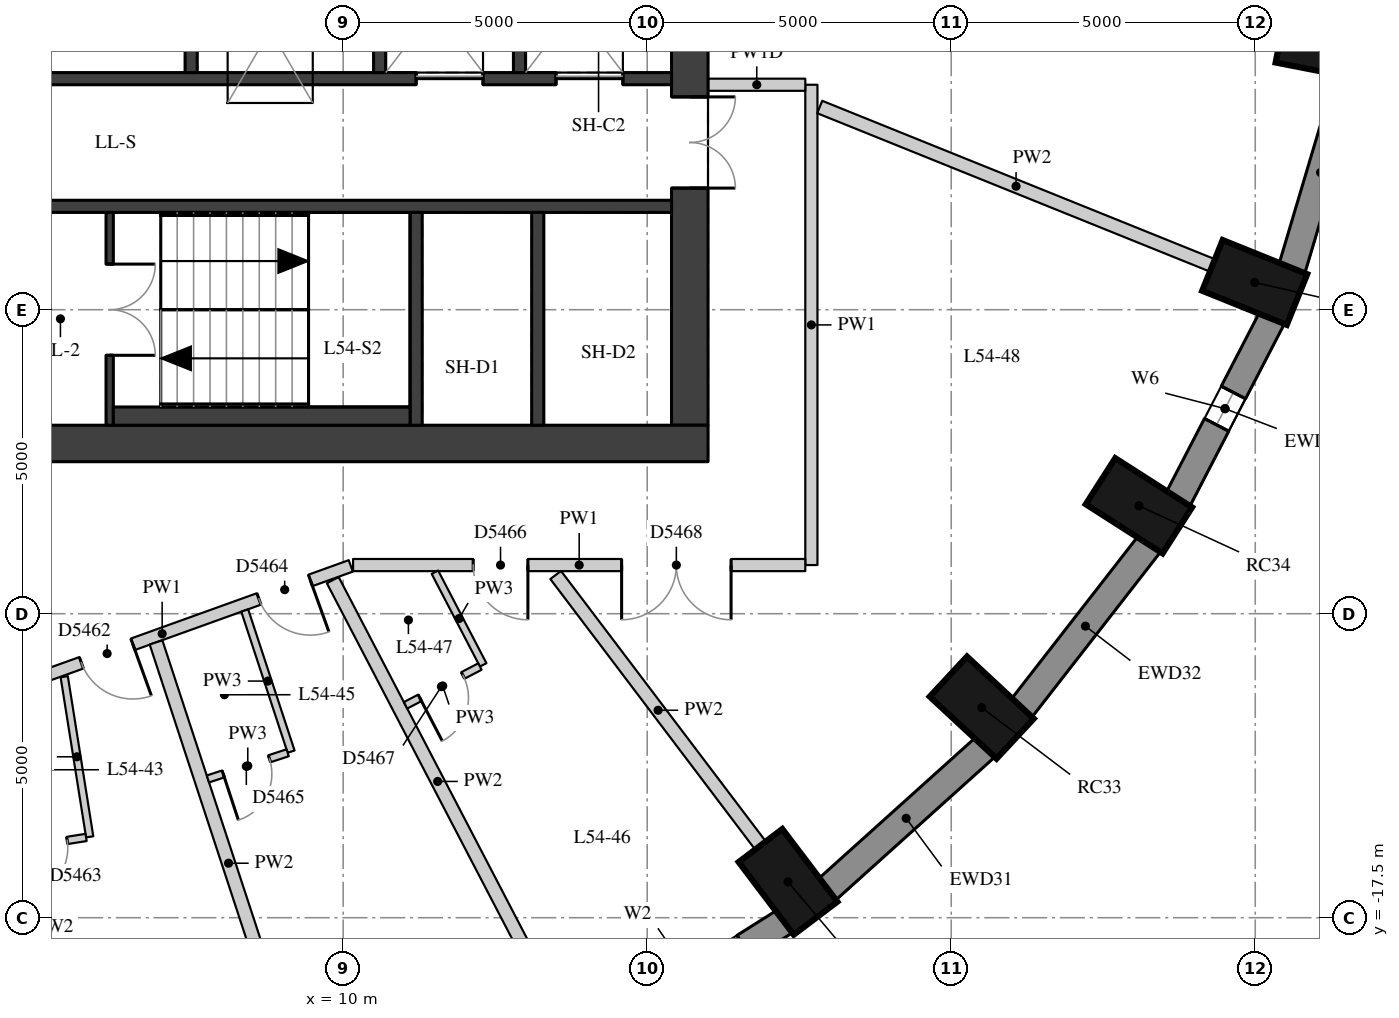
"""IFC4 building model, lengths in metres.
Left out: names, types, materials, properties, quantities, classifications, styles, units other than length and angle.
Written with IfcOpenShell. Run it as: python <this file> out.ifc"""

import sys

from ifc_helpers import new_model, si_unit, direction, frame, frame_2d, origin, origin_2d, place, context, subcontext, project, spatial, rectangle, extrude, element, fill, save


model = new_model("IFC4")
c1 = context("Model", 3, precision=1e-05, world=origin(), true_north=direction((0.0, 1.0)))
c2 = subcontext(c1, "Body", "Model", "MODEL_VIEW")
j1 = project(units=[si_unit("LENGTHUNIT", "METRE"), si_unit("PLANEANGLEUNIT", "RADIAN")], contexts=[c1])
p1 = place(None, origin())
s1 = spatial("IfcSite", under=j1, at=p1, CompositionType="ELEMENT")
p2 = place(p1, origin())
s2 = spatial("IfcBuilding", under=s1, at=p2, CompositionType="ELEMENT")
p3 = place(p2, frame((0.0, 0.0, 192.5)))
s3 = spatial("IfcBuildingStorey", under=s2, at=p3, CompositionType="ELEMENT", Elevation=192.5)
for number, where, z_axis, x_axis in (
    (1, (17.316, -16.911, 0.0), (0.0, 0.0, 1.0), (0.604, -0.797, 0.0)),
    (2, (20.502, -14.045, 0.0), (0.0, 0.0, 1.0), (0.732, -0.681, 0.0)),
    (3, (23.087, -10.725, 0.0), (0.0, 0.0, 1.0), (0.842, -0.539, 0.0)),
    (4, (24.991, -7.052, 0.0), (0.0, 0.0, 1.0), (0.927, -0.374, 0.0)),
    (5, (26.157, -3.137, 0.0), (0.0, 0.0, 1.0), (0.981, -0.192, 0.0)),
):
    element("IfcColumn", number, at=place(p3, frame(where, z_axis=z_axis, x_axis=x_axis)), inside=s3, PredefinedType="COLUMN", context=c2, shape_type="SweptSolid", body=[
        extrude(rectangle(XDim=1.5, YDim=0.9, at=origin_2d()), origin(), (0.0, 0.0, 1.0), 3.3),
    ])
p4 = place(p3, frame((14.232, -19.47, 0.0), z_axis=(0.0, 0.0, 1.0), x_axis=(0.84614984472, 0.532945063098, 0.0)))
e6 = element("IfcWall", 6, at=p4, inside=s3, PredefinedType="SOLIDWALL", context=c2, shape_type="SweptSolid", body=[
    extrude(rectangle(XDim=3.586, YDim=0.45, at=frame_2d((1.793, 0.0))), origin(), (0.0, 0.0, 1.0), 3.02),
])
p5 = place(p4, frame((0.793, 0.0, 0.4)))
e7 = element("IfcOpeningElement", 7, at=p5, cuts=e6, PredefinedType="OPENING", context=c2, shape_type="SweptSolid", body=[
    extrude(rectangle(XDim=2.0, YDim=1.75, at=frame_2d((1.0, 0.875))), frame((0.0, 0.235, 0.0), z_axis=(0.0, -1.0, 0.0), x_axis=(1.0, 0.0, 0.0)), (0.0, 0.0, 1.0), 0.47),
])
p6 = place(p3, frame((17.953, -17.04, 0.0), z_axis=(0.0, 0.0, 1.0), x_axis=(0.743442727602, 0.668799604348, 0.0)))
e8 = element("IfcWall", 8, at=p6, inside=s3, PredefinedType="SOLIDWALL", context=c2, shape_type="SweptSolid", body=[
    extrude(rectangle(XDim=3.513, YDim=0.45, at=frame_2d((1.756, 0.0))), origin(), (0.0, 0.0, 1.0), 3.02),
])
p7 = place(p3, frame((21.151, -14.061, 0.0), z_axis=(0.0, 0.0, 1.0), x_axis=(0.614255239631, 0.789107407509, 0.0)))
e9 = element("IfcWall", 9, at=p7, inside=s3, PredefinedType="SOLIDWALL", context=c2, shape_type="SweptSolid", body=[
    extrude(rectangle(XDim=3.438, YDim=0.45, at=frame_2d((1.719, 0.0))), origin(), (0.0, 0.0, 1.0), 3.02),
])
p8 = place(p3, frame((23.727, -10.624, 0.0), z_axis=(0.0, 0.0, 1.0), x_axis=(0.460175500475, 0.887827972505, 0.0)))
e10 = element("IfcWall", 10, at=p8, inside=s3, PredefinedType="SOLIDWALL", context=c2, shape_type="SweptSolid", body=[
    extrude(rectangle(XDim=3.371, YDim=0.45, at=frame_2d((1.685, 0.0))), origin(), (0.0, 0.0, 1.0), 3.02),
])
p9 = place(p8, frame((1.385, 0.0, 0.4)))
e11 = element("IfcOpeningElement", 11, at=p9, cuts=e10, PredefinedType="OPENING", context=c2, shape_type="SweptSolid", body=[
    extrude(rectangle(XDim=0.6, YDim=1.75, at=frame_2d((0.3, 0.875))), frame((0.0, 0.235, 0.0), z_axis=(0.0, -1.0, 0.0), x_axis=(1.0, 0.0, 0.0)), (0.0, 0.0, 1.0), 0.47),
])
p10 = place(p3, frame((25.6, -6.834, 0.0), z_axis=(0.0, 0.0, 1.0), x_axis=(0.285444972963, 0.958395099847, 0.0)))
e12 = element("IfcWall", 12, at=p10, inside=s3, PredefinedType="SOLIDWALL", context=c2, shape_type="SweptSolid", body=[
    extrude(rectangle(XDim=3.32, YDim=0.45, at=frame_2d((1.66, 0.0))), origin(), (0.0, 0.0, 1.0), 3.02),
])
p11 = place(p3, frame((15.7, -9.4, 0.0), z_axis=(0.0, 0.0, 1.0), x_axis=(0.0, 1.0, 0.0)))
e13 = element("IfcWall", 13, at=p11, inside=s3, PredefinedType="SHEAR", context=c2, shape_type="SweptSolid", body=[
    extrude(rectangle(XDim=18.8, YDim=0.6, at=frame_2d((9.4, 0.0))), origin(), (0.0, 0.0, 1.0), 3.02),
])
p12 = place(p11, frame((13.4, 0.0, 0.0)))
e14 = element("IfcOpeningElement", 14, at=p12, cuts=e13, PredefinedType="OPENING", context=c2, shape_type="SweptSolid", body=[
    extrude(rectangle(XDim=1.5, YDim=2.1, at=frame_2d((0.75, 1.05))), frame((0.0, 0.31, 0.0), z_axis=(0.0, -1.0, 0.0), x_axis=(1.0, 0.0, 0.0)), (0.0, 0.0, 1.0), 0.62),
])
p13 = place(p11, frame((3.9, 0.0, 0.0)))
e15 = element("IfcOpeningElement", 15, at=p13, cuts=e13, PredefinedType="OPENING", context=c2, shape_type="SweptSolid", body=[
    extrude(rectangle(XDim=1.5, YDim=2.1, at=frame_2d((0.75, 1.05))), frame((0.0, 0.31, 0.0), z_axis=(0.0, -1.0, 0.0), x_axis=(1.0, 0.0, 0.0)), (0.0, 0.0, 1.0), 0.62),
])
p14 = place(p3, frame((4.0, -9.7, 0.0), z_axis=(0.0, 0.0, 1.0), x_axis=(1.0, 0.0, 0.0)))
e16 = element("IfcWall", 16, at=p14, inside=s3, PredefinedType="SHEAR", context=c2, shape_type="SweptSolid", body=[
    extrude(rectangle(XDim=12.0, YDim=0.6, at=frame_2d((6.0, 0.0))), origin(), (0.0, 0.0, 1.0), 3.02),
])
p15 = place(p3, frame((4.6, -3.7, 0.0), z_axis=(0.0, 0.0, 1.0), x_axis=(1.0, 0.0, 0.0)))
e17 = element("IfcWall", 17, at=p15, inside=s3, PredefinedType="SHEAR", context=c2, shape_type="SweptSolid", body=[
    extrude(rectangle(XDim=10.8, YDim=0.2, at=frame_2d((5.4, 0.0))), origin(), (0.0, 0.0, 1.0), 3.02),
])
p16 = place(p15, frame((6.6, 0.0, 0.0)))
e18 = element("IfcOpeningElement", 18, at=p16, cuts=e17, PredefinedType="OPENING", context=c2, shape_type="SweptSolid", body=[
    extrude(rectangle(XDim=1.1, YDim=2.1, at=frame_2d((0.55, 1.05))), frame((0.0, 0.11, 0.0), z_axis=(0.0, -1.0, 0.0), x_axis=(1.0, 0.0, 0.0)), (0.0, 0.0, 1.0), 0.22),
])
p17 = place(p15, frame((8.9, 0.0, 0.0)))
e19 = element("IfcOpeningElement", 19, at=p17, cuts=e17, PredefinedType="OPENING", context=c2, shape_type="SweptSolid", body=[
    extrude(rectangle(XDim=1.1, YDim=2.1, at=frame_2d((0.55, 1.05))), frame((0.0, 0.11, 0.0), z_axis=(0.0, -1.0, 0.0), x_axis=(1.0, 0.0, 0.0)), (0.0, 0.0, 1.0), 0.22),
])
p18 = place(p3, frame((4.6, -5.8, 0.0), z_axis=(0.0, 0.0, 1.0), x_axis=(1.0, 0.0, 0.0)))
e20 = element("IfcWall", 20, at=p18, inside=s3, PredefinedType="SHEAR", context=c2, shape_type="SweptSolid", body=[
    extrude(rectangle(XDim=10.8, YDim=0.2, at=frame_2d((5.4, 0.0))), origin(), (0.0, 0.0, 1.0), 3.02),
])
for number, where, z_axis, x_axis in (
    (21, (11.2, -9.4, 0.0), (0.0, 0.0, 1.0), (0.0, 1.0, 0.0)),
    (22, (13.2, -9.4, 0.0), (0.0, 0.0, 1.0), (0.0, 1.0, 0.0)),
):
    element("IfcWall", number, at=place(p3, frame(where, z_axis=z_axis, x_axis=x_axis)), inside=s3, PredefinedType="SHEAR", context=c2, shape_type="SweptSolid", body=[
        extrude(rectangle(XDim=3.5, YDim=0.2, at=frame_2d((1.75, 0.0))), origin(), (0.0, 0.0, 1.0), 3.02),
    ])
p19 = place(p3, frame((7.5, -3.6, 0.0), z_axis=(0.0, 0.0, 1.0), x_axis=(0.0, 1.0, 0.0)))
e23 = element("IfcWall", 23, at=p19, inside=s3, PredefinedType="SHEAR", context=c2, shape_type="SweptSolid", body=[
    extrude(rectangle(XDim=2.5, YDim=0.2, at=frame_2d((1.25, 0.0))), origin(), (0.0, 0.0, 1.0), 3.02),
])
p20 = place(p19, frame((0.7, 0.0, 0.0)))
e24 = element("IfcOpeningElement", 24, at=p20, cuts=e23, PredefinedType="OPENING", context=c2, shape_type="SweptSolid", body=[
    extrude(rectangle(XDim=1.1, YDim=2.1, at=frame_2d((0.55, 1.05))), frame((0.0, 0.11, 0.0), z_axis=(0.0, -1.0, 0.0), x_axis=(1.0, 0.0, 0.0)), (0.0, 0.0, 1.0), 0.22),
])
for number, where, z_axis, x_axis in (
    (25, (10.6, -3.6, 0.0), (0.0, 0.0, 1.0), (0.0, 1.0, 0.0)),
    (26, (12.9, -3.6, 0.0), (0.0, 0.0, 1.0), (0.0, 1.0, 0.0)),
):
    element("IfcWall", number, at=place(p3, frame(where, z_axis=z_axis, x_axis=x_axis)), inside=s3, PredefinedType="SHEAR", context=c2, shape_type="SweptSolid", body=[
        extrude(rectangle(XDim=2.5, YDim=0.2, at=frame_2d((1.25, 0.0))), origin(), (0.0, 0.0, 1.0), 3.02),
    ])
p21 = place(p3, frame((6.16, -9.4, 0.0), z_axis=(0.0, 0.0, 1.0), x_axis=(0.0, 1.0, 0.0)))
e27 = element("IfcWall", 27, at=p21, inside=s3, PredefinedType="SHEAR", context=c2, shape_type="SweptSolid", body=[
    extrude(rectangle(XDim=3.5, YDim=0.12, at=frame_2d((1.75, 0.0))), origin(), (0.0, 0.0, 1.0), 3.02),
])
p22 = place(p21, frame((1.15, 0.0, 0.0)))
e28 = element("IfcOpeningElement", 28, at=p22, cuts=e27, PredefinedType="OPENING", context=c2, shape_type="SweptSolid", body=[
    extrude(rectangle(XDim=1.5, YDim=2.1, at=frame_2d((0.75, 1.05))), frame((0.0, 0.07, 0.0), z_axis=(0.0, -1.0, 0.0), x_axis=(1.0, 0.0, 0.0)), (0.0, 0.0, 1.0), 0.14),
])
p23 = place(p3, frame((6.22, -9.25, 0.0), z_axis=(0.0, 0.0, 1.0), x_axis=(1.0, 0.0, 0.0)))
e29 = element("IfcWall", 29, at=p23, inside=s3, PredefinedType="PARTITIONING", context=c2, shape_type="SweptSolid", body=[
    extrude(rectangle(XDim=4.88, YDim=0.3, at=frame_2d((2.44, 0.0))), origin(), (0.0, 0.0, 1.0), 3.02),
])
p24 = place(p3, frame((17.7, -3.8, 0.0), z_axis=(0.0, 0.0, 1.0), x_axis=(0.0, -1.0, 0.0)))
e30 = element("IfcWall", 30, at=p24, inside=s3, PredefinedType="PARTITIONING", context=c2, shape_type="SweptSolid", body=[
    extrude(rectangle(XDim=7.9, YDim=0.2, at=frame_2d((3.95, 0.0))), origin(), (0.0, 0.0, 1.0), 3.02),
])
p25 = place(p3, frame((17.6, -11.7, 0.0), z_axis=(0.0, 0.0, 1.0), x_axis=(-1.0, 0.0, 0.0)))
e31 = element("IfcWall", 31, at=p25, inside=s3, PredefinedType="PARTITIONING", context=c2, shape_type="SweptSolid", body=[
    extrude(rectangle(XDim=7.437, YDim=0.2, at=frame_2d((3.719, 0.0))), origin(), (0.0, 0.0, 1.0), 3.02),
])
p26 = place(p25, frame((4.562, 0.0, 0.0)))
e32 = element("IfcOpeningElement", 32, at=p26, cuts=e31, PredefinedType="OPENING", context=c2, shape_type="SweptSolid", body=[
    extrude(rectangle(XDim=0.9, YDim=2.1, at=frame_2d((0.45, 1.05))), frame((0.0, 0.11, 0.0), z_axis=(0.0, -1.0, 0.0), x_axis=(1.0, 0.0, 0.0)), (0.0, 0.0, 1.0), 0.22),
])
p27 = place(p25, frame((1.22, 0.0, 0.0)))
e33 = element("IfcOpeningElement", 33, at=p27, cuts=e31, PredefinedType="OPENING", context=c2, shape_type="SweptSolid", body=[
    extrude(rectangle(XDim=1.8, YDim=2.1, at=frame_2d((0.9, 1.05))), frame((0.0, 0.11, 0.0), z_axis=(0.0, -1.0, 0.0), x_axis=(1.0, 0.0, 0.0)), (0.0, 0.0, 1.0), 0.22),
])
p28 = place(p3, frame((10.125, -11.714, 0.0), z_axis=(0.0, 0.0, 1.0), x_axis=(-0.940958661946, -0.338521486038, 0.0)))
e34 = element("IfcWall", 34, at=p28, inside=s3, PredefinedType="PARTITIONING", context=c2, shape_type="SweptSolid", body=[
    extrude(rectangle(XDim=6.594, YDim=0.2, at=frame_2d((3.297, 0.0))), origin(), (0.0, 0.0, 1.0), 3.02),
])
p29 = place(p28, frame((3.809, 0.0, 0.0)))
e35 = element("IfcOpeningElement", 35, at=p29, cuts=e34, PredefinedType="OPENING", context=c2, shape_type="SweptSolid", body=[
    extrude(rectangle(XDim=0.9, YDim=2.1, at=frame_2d((0.45, 1.05))), frame((0.0, 0.11, 0.0), z_axis=(0.0, -1.0, 0.0), x_axis=(1.0, 0.0, 0.0)), (0.0, 0.0, 1.0), 0.22),
])
p30 = place(p28, frame((0.706, 0.0, 0.0)))
e36 = element("IfcOpeningElement", 36, at=p30, cuts=e34, PredefinedType="OPENING", context=c2, shape_type="SweptSolid", body=[
    extrude(rectangle(XDim=0.9, YDim=2.1, at=frame_2d((0.45, 1.05))), frame((0.0, 0.11, 0.0), z_axis=(0.0, -1.0, 0.0), x_axis=(1.0, 0.0, 0.0)), (0.0, 0.0, 1.0), 0.22),
])
p31 = place(p3, frame((16.004, -3.8, 0.0), z_axis=(0.0, 0.0, 1.0), x_axis=(1.0, 0.0, 0.0)))
e37 = element("IfcWall", 37, at=p31, inside=s3, PredefinedType="PARTITIONING", context=c2, shape_type="SweptSolid", body=[
    extrude(rectangle(XDim=1.596, YDim=0.2, at=frame_2d((0.798, 0.0))), origin(), (0.0, 0.0, 1.0), 2.47),
])
p32 = place(p3, frame((9.307, -20.235, 0.0), z_axis=(0.0, 0.0, 1.0), x_axis=(-0.311980340154, 0.950088557639, 0.0)))
e38 = element("IfcWall", 38, at=p32, inside=s3, PredefinedType="PARTITIONING", context=c2, shape_type="SweptSolid", body=[
    extrude(rectangle(XDim=7.645, YDim=0.22, at=frame_2d((3.822, 0.0))), origin(), (0.0, 0.0, 1.0), 3.02),
])
p33 = place(p3, frame((13.279, -18.57, 0.0), z_axis=(0.0, 0.0, 1.0), x_axis=(-0.461996036885, 0.886881988712, 0.0)))
e39 = element("IfcWall", 39, at=p33, inside=s3, PredefinedType="PARTITIONING", context=c2, shape_type="SweptSolid", body=[
    extrude(rectangle(XDim=7.467, YDim=0.22, at=frame_2d((3.733, 0.0))), origin(), (0.0, 0.0, 1.0), 3.02),
])
p34 = place(p3, frame((16.863, -16.312, 0.0), z_axis=(0.0, 0.0, 1.0), x_axis=(-0.603626861738, 0.797266963939, 0.0)))
e40 = element("IfcWall", 40, at=p34, inside=s3, PredefinedType="PARTITIONING", context=c2, shape_type="SweptSolid", body=[
    extrude(rectangle(XDim=5.58, YDim=0.22, at=frame_2d((2.79, 0.0))), origin(), (0.0, 0.0, 1.0), 3.02),
])
p35 = place(p3, frame((24.295, -6.771, 0.0), z_axis=(0.0, 0.0, 1.0), x_axis=(-0.927387137769, 0.374103056256, 0.0)))
e41 = element("IfcWall", 41, at=p35, inside=s3, PredefinedType="PARTITIONING", context=c2, shape_type="SweptSolid", body=[
    extrude(rectangle(XDim=6.964, YDim=0.22, at=frame_2d((3.482, 0.0))), origin(), (0.0, 0.0, 1.0), 3.02),
])
p36 = place(p3, frame((5.412, -13.536, 0.0), z_axis=(0.0, 0.0, 1.0), x_axis=(0.157076497257, -0.987586438753, 0.0)))
e42 = element("IfcWall", 42, at=p36, inside=s3, PredefinedType="PARTITIONING", context=c2, shape_type="SweptSolid", body=[
    extrude(rectangle(XDim=2.667, YDim=0.12, at=frame_2d((1.333, 0.0))), origin(), (0.0, 0.0, 1.0), 3.02),
])
p37 = place(p3, frame((8.381, -12.447, 0.0), z_axis=(0.0, 0.0, 1.0), x_axis=(0.312028325996, -0.950072799198, 0.0)))
e43 = element("IfcWall", 43, at=p37, inside=s3, PredefinedType="PARTITIONING", context=c2, shape_type="SweptSolid", body=[
    extrude(rectangle(XDim=2.444, YDim=0.12, at=frame_2d((1.222, 0.0))), origin(), (0.0, 0.0, 1.0), 3.02),
])
p38 = place(p3, frame((11.509, -11.818, 0.0), z_axis=(0.0, 0.0, 1.0), x_axis=(0.461987980812, -0.886886185249, 0.0)))
e44 = element("IfcWall", 44, at=p38, inside=s3, PredefinedType="PARTITIONING", context=c2, shape_type="SweptSolid", body=[
    extrude(rectangle(XDim=1.718, YDim=0.12, at=frame_2d((0.859, 0.0))), origin(), (0.0, 0.0, 1.0), 3.02),
])
p39 = place(p3, frame((5.772, -16.18, 0.0), z_axis=(0.0, 0.0, 1.0), x_axis=(-0.98760899043, -0.156934642514, 0.0)))
e45 = element("IfcWall", 45, at=p39, inside=s3, PredefinedType="PARTITIONING", context=c2, shape_type="SweptSolid", body=[
    extrude(rectangle(XDim=1.38, YDim=0.12, at=frame_2d((0.69, 0.0))), origin(), (0.0, 0.0, 1.0), 3.02),
])
p40 = place(p39, frame((0.315, 0.0, 0.0)))
e46 = element("IfcOpeningElement", 46, at=p40, cuts=e45, PredefinedType="OPENING", context=c2, shape_type="SweptSolid", body=[
    extrude(rectangle(XDim=0.8, YDim=2.1, at=frame_2d((0.4, 1.05))), frame((0.0, 0.07, 0.0), z_axis=(0.0, -1.0, 0.0), x_axis=(1.0, 0.0, 0.0)), (0.0, 0.0, 1.0), 0.14),
])
p41 = place(p3, frame((9.087, -14.788, 0.0), z_axis=(0.0, 0.0, 1.0), x_axis=(-0.950123887932, -0.311872726573, 0.0)))
e47 = element("IfcWall", 47, at=p41, inside=s3, PredefinedType="PARTITIONING", context=c2, shape_type="SweptSolid", body=[
    extrude(rectangle(XDim=1.38, YDim=0.12, at=frame_2d((0.69, 0.0))), origin(), (0.0, 0.0, 1.0), 3.02),
])
p42 = place(p41, frame((0.315, 0.0, 0.0)))
e48 = element("IfcOpeningElement", 48, at=p42, cuts=e47, PredefinedType="OPENING", context=c2, shape_type="SweptSolid", body=[
    extrude(rectangle(XDim=0.8, YDim=2.1, at=frame_2d((0.4, 1.05))), frame((0.0, 0.07, 0.0), z_axis=(0.0, -1.0, 0.0), x_axis=(1.0, 0.0, 0.0)), (0.0, 0.0, 1.0), 0.14),
])
p43 = place(p3, frame((12.249, -13.369, 0.0), z_axis=(0.0, 0.0, 1.0), x_axis=(-0.886834011057, -0.462088126695, 0.0)))
e49 = element("IfcWall", 49, at=p43, inside=s3, PredefinedType="PARTITIONING", context=c2, shape_type="SweptSolid", body=[
    extrude(rectangle(XDim=1.379, YDim=0.12, at=frame_2d((0.69, 0.0))), origin(), (0.0, 0.0, 1.0), 3.02),
])
p44 = place(p43, frame((0.315, 0.0, 0.0)))
e50 = element("IfcOpeningElement", 50, at=p44, cuts=e49, PredefinedType="OPENING", context=c2, shape_type="SweptSolid", body=[
    extrude(rectangle(XDim=0.8, YDim=2.1, at=frame_2d((0.4, 1.05))), frame((0.0, 0.07, 0.0), z_axis=(0.0, -1.0, 0.0), x_axis=(1.0, 0.0, 0.0)), (0.0, 0.0, 1.0), 0.14),
])
p45 = place(p9, origin())
e51 = element("IfcWindow", 51, at=p45, inside=s3, PartitioningType="SINGLE_PANEL", PredefinedType="WINDOW", context=c2, shape_type="SweptSolid", body=[
    extrude(rectangle(XDim=0.6, YDim=1.75, at=frame_2d((0.3, 0.875))), frame((0.0, 0.035, 0.0), z_axis=(0.0, -1.0, 0.0), x_axis=(1.0, 0.0, 0.0)), (0.0, 0.0, 1.0), 0.06),
])
fill(e11, e51)
p46 = place(p13, origin())
e52 = element("IfcDoor", 52, at=p46, inside=s3, OperationType="DOUBLE_DOOR_SINGLE_SWING", PredefinedType="DOOR", context=c2, shape_type="SweptSolid", body=[
    extrude(rectangle(XDim=1.5, YDim=2.1, at=frame_2d((0.75, 1.05))), frame((0.0, 0.025, 0.0), z_axis=(0.0, -1.0, 0.0), x_axis=(1.0, 0.0, 0.0)), (0.0, 0.0, 1.0), 0.05),
])
fill(e15, e52)
p47 = place(p22, origin())
e53 = element("IfcDoor", 53, at=p47, inside=s3, OperationType="DOUBLE_DOOR_SINGLE_SWING", PredefinedType="DOOR", context=c2, shape_type="SweptSolid", body=[
    extrude(rectangle(XDim=1.5, YDim=2.1, at=frame_2d((0.75, 1.05))), frame((0.0, 0.025, 0.0), z_axis=(0.0, -1.0, 0.0), x_axis=(1.0, 0.0, 0.0)), (0.0, 0.0, 1.0), 0.05),
])
fill(e28, e53)
p48 = place(p16, origin())
e54 = element("IfcDoor", 54, at=p48, inside=s3, OperationType="DOUBLE_DOOR_SLIDING", PredefinedType="DOOR", context=c2, shape_type="SweptSolid", body=[
    extrude(rectangle(XDim=1.1, YDim=2.1, at=frame_2d((0.55, 1.05))), frame((0.0, 0.025, 0.0), z_axis=(0.0, -1.0, 0.0), x_axis=(1.0, 0.0, 0.0)), (0.0, 0.0, 1.0), 0.05),
])
fill(e18, e54)
p49 = place(p17, origin())
e55 = element("IfcDoor", 55, at=p49, inside=s3, OperationType="DOUBLE_DOOR_SLIDING", PredefinedType="DOOR", context=c2, shape_type="SweptSolid", body=[
    extrude(rectangle(XDim=1.1, YDim=2.1, at=frame_2d((0.55, 1.05))), frame((0.0, 0.025, 0.0), z_axis=(0.0, -1.0, 0.0), x_axis=(1.0, 0.0, 0.0)), (0.0, 0.0, 1.0), 0.05),
])
fill(e19, e55)
p50 = place(p29, origin())
e56 = element("IfcDoor", 56, at=p50, inside=s3, OperationType="SINGLE_SWING_LEFT", PredefinedType="DOOR", context=c2, shape_type="SweptSolid", body=[
    extrude(rectangle(XDim=0.9, YDim=2.1, at=frame_2d((0.45, 1.05))), frame((0.0, 0.025, 0.0), z_axis=(0.0, -1.0, 0.0), x_axis=(1.0, 0.0, 0.0)), (0.0, 0.0, 1.0), 0.05),
])
fill(e35, e56)
p51 = place(p40, origin())
e57 = element("IfcDoor", 57, at=p51, inside=s3, OperationType="SINGLE_SWING_RIGHT", PredefinedType="DOOR", context=c2, shape_type="SweptSolid", body=[
    extrude(rectangle(XDim=0.8, YDim=2.1, at=frame_2d((0.4, 1.05))), frame((0.0, 0.025, 0.0), z_axis=(0.0, -1.0, 0.0), x_axis=(1.0, 0.0, 0.0)), (0.0, 0.0, 1.0), 0.05),
])
fill(e46, e57)
p52 = place(p30, origin())
e58 = element("IfcDoor", 58, at=p52, inside=s3, OperationType="SINGLE_SWING_LEFT", PredefinedType="DOOR", context=c2, shape_type="SweptSolid", body=[
    extrude(rectangle(XDim=0.9, YDim=2.1, at=frame_2d((0.45, 1.05))), frame((0.0, 0.025, 0.0), z_axis=(0.0, -1.0, 0.0), x_axis=(1.0, 0.0, 0.0)), (0.0, 0.0, 1.0), 0.05),
])
fill(e36, e58)
p53 = place(p42, origin())
e59 = element("IfcDoor", 59, at=p53, inside=s3, OperationType="SINGLE_SWING_RIGHT", PredefinedType="DOOR", context=c2, shape_type="SweptSolid", body=[
    extrude(rectangle(XDim=0.8, YDim=2.1, at=frame_2d((0.4, 1.05))), frame((0.0, 0.025, 0.0), z_axis=(0.0, -1.0, 0.0), x_axis=(1.0, 0.0, 0.0)), (0.0, 0.0, 1.0), 0.05),
])
fill(e48, e59)
p54 = place(p26, origin())
e60 = element("IfcDoor", 60, at=p54, inside=s3, OperationType="SINGLE_SWING_LEFT", PredefinedType="DOOR", context=c2, shape_type="SweptSolid", body=[
    extrude(rectangle(XDim=0.9, YDim=2.1, at=frame_2d((0.45, 1.05))), frame((0.0, 0.025, 0.0), z_axis=(0.0, -1.0, 0.0), x_axis=(1.0, 0.0, 0.0)), (0.0, 0.0, 1.0), 0.05),
])
fill(e32, e60)
p55 = place(p44, origin())
e61 = element("IfcDoor", 61, at=p55, inside=s3, OperationType="SINGLE_SWING_RIGHT", PredefinedType="DOOR", context=c2, shape_type="SweptSolid", body=[
    extrude(rectangle(XDim=0.8, YDim=2.1, at=frame_2d((0.4, 1.05))), frame((0.0, 0.025, 0.0), z_axis=(0.0, -1.0, 0.0), x_axis=(1.0, 0.0, 0.0)), (0.0, 0.0, 1.0), 0.05),
])
fill(e50, e61)
p56 = place(p27, origin())
e62 = element("IfcDoor", 62, at=p56, inside=s3, OperationType="DOUBLE_DOOR_SINGLE_SWING", PredefinedType="DOOR", context=c2, shape_type="SweptSolid", body=[
    extrude(rectangle(XDim=1.8, YDim=2.1, at=frame_2d((0.9, 1.05))), frame((0.0, 0.025, 0.0), z_axis=(0.0, -1.0, 0.0), x_axis=(1.0, 0.0, 0.0)), (0.0, 0.0, 1.0), 0.05),
])
fill(e33, e62)
save(model, sys.argv[1])
